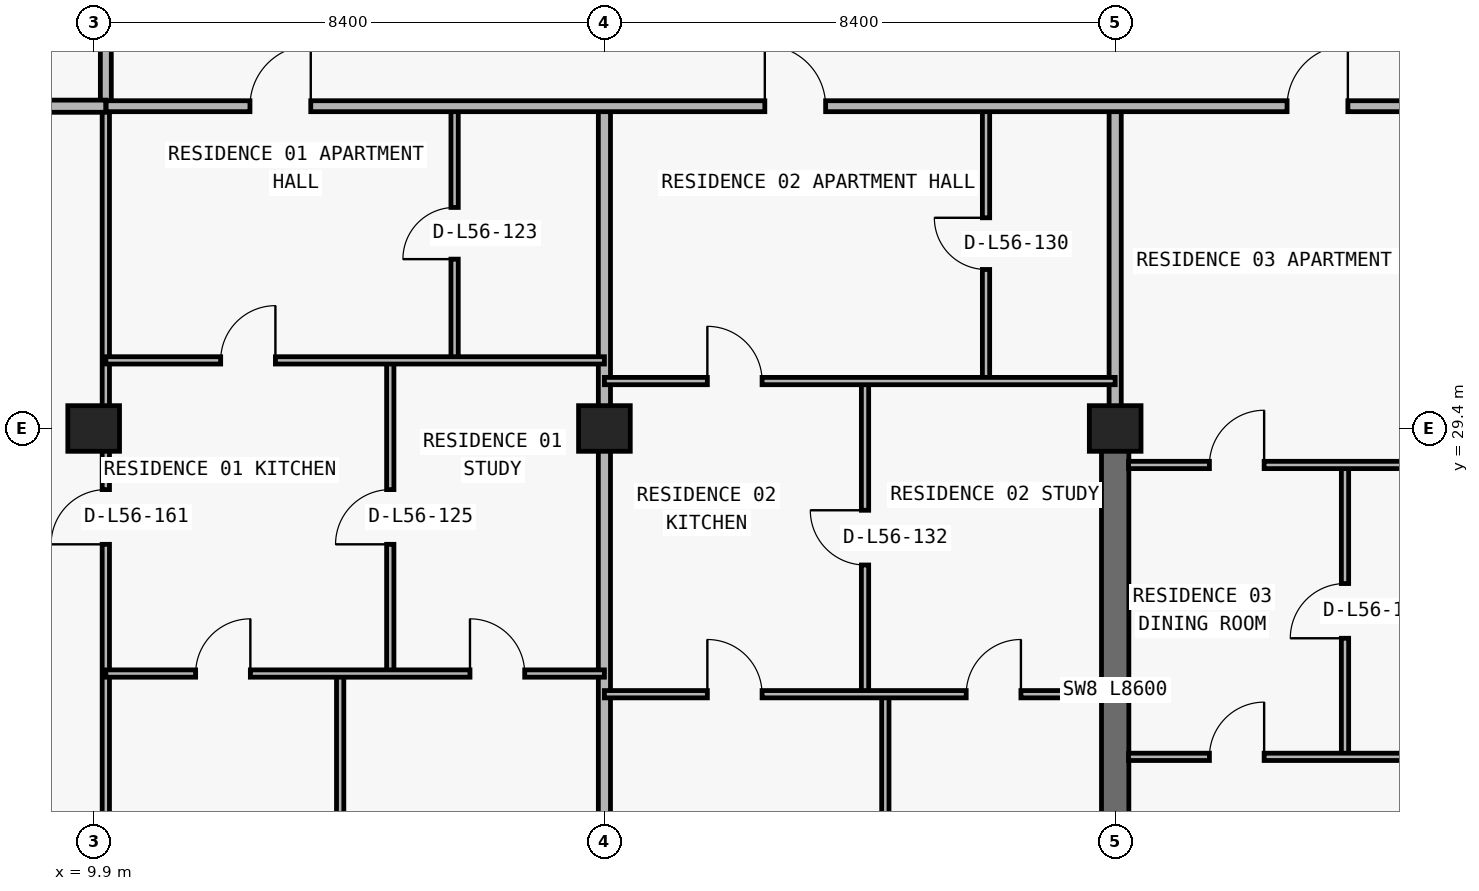
"""IFC4 building model, lengths in metres.
Left out: names, types, materials, properties, quantities, classifications, styles, units other than length and angle.
Written with IfcOpenShell. Run it as: python <this file> out.ifc"""

import sys

from ifc_helpers import new_model, si_unit, direction, frame, frame_2d, origin, origin_2d, place, context, subcontext, project, spatial, rectangle, extrude, element, fill, save


model = new_model("IFC4")
c1 = context("Model", 3, precision=1e-05, world=origin(), true_north=direction((0.0, 1.0)))
c2 = subcontext(c1, "Body", "Model", "MODEL_VIEW")
j1 = project(units=[si_unit("LENGTHUNIT", "METRE"), si_unit("PLANEANGLEUNIT", "RADIAN")], contexts=[c1])
p1 = place(None, origin())
s1 = spatial("IfcSite", under=j1, at=p1, CompositionType="ELEMENT")
p2 = place(p1, origin())
s2 = spatial("IfcBuilding", under=s1, at=p2, CompositionType="ELEMENT")
p3 = place(p2, frame((0.0, 0.0, 201.6)))
s3 = spatial("IfcBuildingStorey", under=s2, at=p3, CompositionType="ELEMENT", Elevation=201.6)
for number, where, z_axis, x_axis in (
    (1, (9.9, 29.4, 0.0), (0.0, 0.0, 1.0), (1.0, 0.0, 0.0)),
    (2, (18.3, 29.4, 0.0), (0.0, 0.0, 1.0), (1.0, 0.0, 0.0)),
    (3, (26.7, 29.4, 0.0), (0.0, 0.0, 1.0), (1.0, 0.0, 0.0)),
):
    element("IfcColumn", number, at=place(p3, frame(where, z_axis=z_axis, x_axis=x_axis)), inside=s3, PredefinedType="COLUMN", context=c2, shape_type="SweptSolid", body=[
        extrude(rectangle(XDim=0.85, YDim=0.75, at=origin_2d()), origin(), (0.0, 0.0, 1.0), 3.05),
    ])
p4 = place(p3, frame((26.7, 20.8, 0.0), z_axis=(0.0, 0.0, 1.0), x_axis=(0.0, 1.0, 0.0)))
e4 = element("IfcWall", 4, at=p4, inside=s3, PredefinedType="SHEAR", context=c2, shape_type="SweptSolid", body=[
    extrude(rectangle(XDim=8.6, YDim=0.45, at=frame_2d((4.3, 0.0))), origin(), (0.0, 0.0, 1.0), 3.05),
])
p5 = place(p3, frame((10.1, 11.285, 0.0), z_axis=(0.0, 0.0, 1.0), x_axis=(0.0, 1.0, 0.0)))
e5 = element("IfcWall", 5, at=p5, inside=s3, PredefinedType="PARTITIONING", context=c2, shape_type="SweptSolid", body=[
    extrude(rectangle(XDim=23.415, YDim=0.12, at=frame_2d((11.708, 0.0))), origin(), (0.0, 0.0, 1.0), 2.263),
])
p6 = place(p5, frame((16.21, 0.0, 0.0)))
e6 = element("IfcOpeningElement", 6, at=p6, cuts=e5, PredefinedType="OPENING", context=c2, shape_type="SweptSolid", body=[
    extrude(rectangle(XDim=0.9, YDim=2.15, at=frame_2d((0.45, 1.075))), frame((0.0, 0.07, 0.0), z_axis=(0.0, -1.0, 0.0), x_axis=(1.0, 0.0, 0.0)), (0.0, 0.0, 1.0), 0.14),
])
p7 = place(p3, frame((10.1, 34.705, 0.0), z_axis=(0.0, 0.0, 1.0), x_axis=(0.0, 1.0, 0.0)))
e7 = element("IfcWall", 7, at=p7, inside=s3, PredefinedType="PARTITIONING", context=c2, shape_type="SweptSolid", body=[
    extrude(rectangle(XDim=2.295, YDim=0.18, at=frame_2d((1.147, 0.0))), origin(), (0.0, 0.0, 1.0), 2.263),
])
p8 = place(p3, frame((13.954, 11.24, 0.0), z_axis=(0.0, 0.0, 1.0), x_axis=(0.0, 1.0, 0.0)))
e8 = element("IfcWall", 8, at=p8, inside=s3, PredefinedType="PARTITIONING", context=c2, shape_type="SweptSolid", body=[
    extrude(rectangle(XDim=14.13, YDim=0.12, at=frame_2d((7.065, 0.0))), origin(), (0.0, 0.0, 1.0), 3.05),
])
p9 = place(p3, frame((14.778, 25.37, 0.0), z_axis=(0.0, 0.0, 1.0), x_axis=(0.0, 1.0, 0.0)))
e9 = element("IfcWall", 9, at=p9, inside=s3, PredefinedType="PARTITIONING", context=c2, shape_type="SweptSolid", body=[
    extrude(rectangle(XDim=5.15, YDim=0.12, at=frame_2d((2.575, 0.0))), origin(), (0.0, 0.0, 1.0), 3.05),
])
p10 = place(p9, frame((2.125, 0.0, 0.0)))
e10 = element("IfcOpeningElement", 10, at=p10, cuts=e9, PredefinedType="OPENING", context=c2, shape_type="SweptSolid", body=[
    extrude(rectangle(XDim=0.9, YDim=2.15, at=frame_2d((0.45, 1.075))), frame((0.0, 0.07, 0.0), z_axis=(0.0, -1.0, 0.0), x_axis=(1.0, 0.0, 0.0)), (0.0, 0.0, 1.0), 0.14),
])
p11 = place(p3, frame((15.836, 30.52, 0.0), z_axis=(0.0, 0.0, 1.0), x_axis=(0.0, 1.0, 0.0)))
e11 = element("IfcWall", 11, at=p11, inside=s3, PredefinedType="PARTITIONING", context=c2, shape_type="SweptSolid", body=[
    extrude(rectangle(XDim=4.18, YDim=0.12, at=frame_2d((2.09, 0.0))), origin(), (0.0, 0.0, 1.0), 3.05),
])
p12 = place(p11, frame((1.665, 0.0, 0.0)))
e12 = element("IfcOpeningElement", 12, at=p12, cuts=e11, PredefinedType="OPENING", context=c2, shape_type="SweptSolid", body=[
    extrude(rectangle(XDim=0.85, YDim=2.1, at=frame_2d((0.425, 1.05))), frame((0.0, 0.07, 0.0), z_axis=(0.0, -1.0, 0.0), x_axis=(1.0, 0.0, 0.0)), (0.0, 0.0, 1.0), 0.14),
])
p13 = place(p3, frame((18.3, 11.24, 0.0), z_axis=(0.0, 0.0, 1.0), x_axis=(0.0, 1.0, 0.0)))
e13 = element("IfcWall", 13, at=p13, inside=s3, PredefinedType="PARTITIONING", context=c2, shape_type="SweptSolid", body=[
    extrude(rectangle(XDim=23.46, YDim=0.2, at=frame_2d((11.73, 0.0))), origin(), (0.0, 0.0, 1.0), 2.263),
])
p14 = place(p3, frame((22.586, 25.03, 0.0), z_axis=(0.0, 0.0, 1.0), x_axis=(0.0, 1.0, 0.0)))
e14 = element("IfcWall", 14, at=p14, inside=s3, PredefinedType="PARTITIONING", context=c2, shape_type="SweptSolid", body=[
    extrude(rectangle(XDim=5.15, YDim=0.12, at=frame_2d((2.575, 0.0))), origin(), (0.0, 0.0, 1.0), 2.725),
])
p15 = place(p14, frame((2.125, 0.0, 0.0)))
e15 = element("IfcOpeningElement", 15, at=p15, cuts=e14, PredefinedType="OPENING", context=c2, shape_type="SweptSolid", body=[
    extrude(rectangle(XDim=0.9, YDim=2.15, at=frame_2d((0.45, 1.075))), frame((0.0, 0.07, 0.0), z_axis=(0.0, -1.0, 0.0), x_axis=(1.0, 0.0, 0.0)), (0.0, 0.0, 1.0), 0.14),
])
p16 = place(p3, frame((22.92, 11.24, 0.0), z_axis=(0.0, 0.0, 1.0), x_axis=(0.0, 1.0, 0.0)))
e16 = element("IfcWall", 16, at=p16, inside=s3, PredefinedType="PARTITIONING", context=c2, shape_type="SweptSolid", body=[
    extrude(rectangle(XDim=13.79, YDim=0.12, at=frame_2d((6.895, 0.0))), origin(), (0.0, 0.0, 1.0), 3.05),
])
p17 = place(p3, frame((24.576, 30.18, 0.0), z_axis=(0.0, 0.0, 1.0), x_axis=(0.0, 1.0, 0.0)))
e17 = element("IfcWall", 17, at=p17, inside=s3, PredefinedType="PARTITIONING", context=c2, shape_type="SweptSolid", body=[
    extrude(rectangle(XDim=4.52, YDim=0.12, at=frame_2d((2.26, 0.0))), origin(), (0.0, 0.0, 1.0), 3.05),
])
p18 = place(p17, frame((1.835, 0.0, 0.0)))
e18 = element("IfcOpeningElement", 18, at=p18, cuts=e17, PredefinedType="OPENING", context=c2, shape_type="SweptSolid", body=[
    extrude(rectangle(XDim=0.85, YDim=2.1, at=frame_2d((0.425, 1.05))), frame((0.0, 0.07, 0.0), z_axis=(0.0, -1.0, 0.0), x_axis=(1.0, 0.0, 0.0)), (0.0, 0.0, 1.0), 0.14),
])
p19 = place(p3, frame((26.7, 29.405, 0.0), z_axis=(0.0, 0.0, 1.0), x_axis=(0.0, 1.0, 0.0)))
e19 = element("IfcWall", 19, at=p19, inside=s3, PredefinedType="PARTITIONING", context=c2, shape_type="SweptSolid", body=[
    extrude(rectangle(XDim=5.295, YDim=0.2, at=frame_2d((2.647, 0.0))), origin(), (0.0, 0.0, 1.0), 2.335),
])
p20 = place(p3, frame((30.48, 24.0, 0.0), z_axis=(0.0, 0.0, 1.0), x_axis=(0.0, 1.0, 0.0)))
e20 = element("IfcWall", 20, at=p20, inside=s3, PredefinedType="PARTITIONING", context=c2, shape_type="SweptSolid", body=[
    extrude(rectangle(XDim=4.8, YDim=0.12, at=frame_2d((2.4, 0.0))), origin(), (0.0, 0.0, 1.0), 3.05),
])
p21 = place(p20, frame((1.95, 0.0, 0.0)))
e21 = element("IfcOpeningElement", 21, at=p21, cuts=e20, PredefinedType="OPENING", context=c2, shape_type="SweptSolid", body=[
    extrude(rectangle(XDim=0.9, YDim=2.15, at=frame_2d((0.45, 1.075))), frame((0.0, 0.07, 0.0), z_axis=(0.0, -1.0, 0.0), x_axis=(1.0, 0.0, 0.0)), (0.0, 0.0, 1.0), 0.14),
])
p22 = place(p3, frame((26.92, 24.0, 0.0), z_axis=(0.0, 0.0, 1.0), x_axis=(1.0, 0.0, 0.0)))
e22 = element("IfcWall", 22, at=p22, inside=s3, PredefinedType="PARTITIONING", context=c2, shape_type="SweptSolid", body=[
    extrude(rectangle(XDim=8.18, YDim=0.12, at=frame_2d((4.09, 0.0))), origin(), (0.0, 0.0, 1.0), 3.05),
])
p23 = place(p22, frame((1.33, 0.0, 0.0)))
e23 = element("IfcOpeningElement", 23, at=p23, cuts=e22, PredefinedType="OPENING", context=c2, shape_type="SweptSolid", body=[
    extrude(rectangle(XDim=0.9, YDim=2.15, at=frame_2d((0.45, 1.075))), frame((0.0, 0.07, 0.0), z_axis=(0.0, -1.0, 0.0), x_axis=(1.0, 0.0, 0.0)), (0.0, 0.0, 1.0), 0.14),
])
p24 = place(p3, frame((18.3, 25.03, 0.0), z_axis=(0.0, 0.0, 1.0), x_axis=(1.0, 0.0, 0.0)))
e24 = element("IfcWall", 24, at=p24, inside=s3, PredefinedType="PARTITIONING", context=c2, shape_type="SweptSolid", body=[
    extrude(rectangle(XDim=8.18, YDim=0.12, at=frame_2d((4.09, 0.0))), origin(), (0.0, 0.0, 1.0), 3.05),
])
p25 = place(p24, frame((1.693, 0.0, 0.0)))
e25 = element("IfcOpeningElement", 25, at=p25, cuts=e24, PredefinedType="OPENING", context=c2, shape_type="SweptSolid", body=[
    extrude(rectangle(XDim=0.9, YDim=2.15, at=frame_2d((0.45, 1.075))), frame((0.0, 0.07, 0.0), z_axis=(0.0, -1.0, 0.0), x_axis=(1.0, 0.0, 0.0)), (0.0, 0.0, 1.0), 0.14),
])
p26 = place(p24, frame((5.95, 0.0, 0.0)))
e26 = element("IfcOpeningElement", 26, at=p26, cuts=e24, PredefinedType="OPENING", context=c2, shape_type="SweptSolid", body=[
    extrude(rectangle(XDim=0.9, YDim=2.15, at=frame_2d((0.45, 1.075))), frame((0.0, 0.07, 0.0), z_axis=(0.0, -1.0, 0.0), x_axis=(1.0, 0.0, 0.0)), (0.0, 0.0, 1.0), 0.14),
])
p27 = place(p3, frame((10.1, 25.37, 0.0), z_axis=(0.0, 0.0, 1.0), x_axis=(1.0, 0.0, 0.0)))
e27 = element("IfcWall", 27, at=p27, inside=s3, PredefinedType="PARTITIONING", context=c2, shape_type="SweptSolid", body=[
    extrude(rectangle(XDim=8.2, YDim=0.12, at=frame_2d((4.1, 0.0))), origin(), (0.0, 0.0, 1.0), 3.05),
])
p28 = place(p27, frame((1.477, 0.0, 0.0)))
e28 = element("IfcOpeningElement", 28, at=p28, cuts=e27, PredefinedType="OPENING", context=c2, shape_type="SweptSolid", body=[
    extrude(rectangle(XDim=0.9, YDim=2.15, at=frame_2d((0.45, 1.075))), frame((0.0, 0.07, 0.0), z_axis=(0.0, -1.0, 0.0), x_axis=(1.0, 0.0, 0.0)), (0.0, 0.0, 1.0), 0.14),
])
p29 = place(p27, frame((5.989, 0.0, 0.0)))
e29 = element("IfcOpeningElement", 29, at=p29, cuts=e27, PredefinedType="OPENING", context=c2, shape_type="SweptSolid", body=[
    extrude(rectangle(XDim=0.9, YDim=2.15, at=frame_2d((0.45, 1.075))), frame((0.0, 0.07, 0.0), z_axis=(0.0, -1.0, 0.0), x_axis=(1.0, 0.0, 0.0)), (0.0, 0.0, 1.0), 0.14),
])
p30 = place(p3, frame((26.92, 28.8, 0.0), z_axis=(0.0, 0.0, 1.0), x_axis=(1.0, 0.0, 0.0)))
e30 = element("IfcWall", 30, at=p30, inside=s3, PredefinedType="PARTITIONING", context=c2, shape_type="SweptSolid", body=[
    extrude(rectangle(XDim=8.175, YDim=0.12, at=frame_2d((4.087, 0.0))), origin(), (0.0, 0.0, 1.0), 3.05),
])
p31 = place(p30, frame((1.33, 0.0, 0.0)))
e31 = element("IfcOpeningElement", 31, at=p31, cuts=e30, PredefinedType="OPENING", context=c2, shape_type="SweptSolid", body=[
    extrude(rectangle(XDim=0.9, YDim=2.15, at=frame_2d((0.45, 1.075))), frame((0.0, 0.07, 0.0), z_axis=(0.0, -1.0, 0.0), x_axis=(1.0, 0.0, 0.0)), (0.0, 0.0, 1.0), 0.14),
])
p32 = place(p3, frame((18.3, 30.18, 0.0), z_axis=(0.0, 0.0, 1.0), x_axis=(1.0, 0.0, 0.0)))
e32 = element("IfcWall", 32, at=p32, inside=s3, PredefinedType="PARTITIONING", context=c2, shape_type="SweptSolid", body=[
    extrude(rectangle(XDim=8.4, YDim=0.12, at=frame_2d((4.2, 0.0))), origin(), (0.0, 0.0, 1.0), 3.05),
])
p33 = place(p32, frame((1.693, 0.0, 0.0)))
e33 = element("IfcOpeningElement", 33, at=p33, cuts=e32, PredefinedType="OPENING", context=c2, shape_type="SweptSolid", body=[
    extrude(rectangle(XDim=0.9, YDim=2.15, at=frame_2d((0.45, 1.075))), frame((0.0, 0.07, 0.0), z_axis=(0.0, -1.0, 0.0), x_axis=(1.0, 0.0, 0.0)), (0.0, 0.0, 1.0), 0.14),
])
p34 = place(p3, frame((10.1, 30.52, 0.0), z_axis=(0.0, 0.0, 1.0), x_axis=(1.0, 0.0, 0.0)))
e34 = element("IfcWall", 34, at=p34, inside=s3, PredefinedType="PARTITIONING", context=c2, shape_type="SweptSolid", body=[
    extrude(rectangle(XDim=8.2, YDim=0.12, at=frame_2d((4.1, 0.0))), origin(), (0.0, 0.0, 1.0), 3.05),
])
p35 = place(p34, frame((1.889, 0.0, 0.0)))
e35 = element("IfcOpeningElement", 35, at=p35, cuts=e34, PredefinedType="OPENING", context=c2, shape_type="SweptSolid", body=[
    extrude(rectangle(XDim=0.9, YDim=2.15, at=frame_2d((0.45, 1.075))), frame((0.0, 0.07, 0.0), z_axis=(0.0, -1.0, 0.0), x_axis=(1.0, 0.0, 0.0)), (0.0, 0.0, 1.0), 0.14),
])
p36 = place(p3, frame((6.395, 34.7, 0.0), z_axis=(0.0, 0.0, 1.0), x_axis=(1.0, 0.0, 0.0)))
e36 = element("IfcWall", 36, at=p36, inside=s3, PredefinedType="PARTITIONING", context=c2, shape_type="SweptSolid", body=[
    extrude(rectangle(XDim=3.705, YDim=0.2, at=frame_2d((1.853, 0.0))), origin(), (0.0, 0.0, 1.0), 3.05),
])
p37 = place(p3, frame((10.105, 34.7, 0.0), z_axis=(0.0, 0.0, 1.0), x_axis=(1.0, 0.0, 0.0)))
e37 = element("IfcWall", 37, at=p37, inside=s3, PredefinedType="PARTITIONING", context=c2, shape_type="SweptSolid", body=[
    extrude(rectangle(XDim=31.021, YDim=0.18, at=frame_2d((15.51, 0.0))), origin(), (0.0, 0.0, 1.0), 3.05),
])
p38 = place(p37, frame((2.365, 0.0, 0.0)))
e38 = element("IfcOpeningElement", 38, at=p38, cuts=e37, PredefinedType="OPENING", context=c2, shape_type="SweptSolid", body=[
    extrude(rectangle(XDim=1.0, YDim=2.2, at=frame_2d((0.5, 1.1))), frame((0.0, 0.1, 0.0), z_axis=(0.0, -1.0, 0.0), x_axis=(1.0, 0.0, 0.0)), (0.0, 0.0, 1.0), 0.2),
])
p39 = place(p37, frame((10.833, 0.0, 0.0)))
e39 = element("IfcOpeningElement", 39, at=p39, cuts=e37, PredefinedType="OPENING", context=c2, shape_type="SweptSolid", body=[
    extrude(rectangle(XDim=1.0, YDim=2.2, at=frame_2d((0.5, 1.1))), frame((0.0, 0.1, 0.0), z_axis=(0.0, -1.0, 0.0), x_axis=(1.0, 0.0, 0.0)), (0.0, 0.0, 1.0), 0.2),
])
p40 = place(p37, frame((19.422, 0.0, 0.0)))
e40 = element("IfcOpeningElement", 40, at=p40, cuts=e37, PredefinedType="OPENING", context=c2, shape_type="SweptSolid", body=[
    extrude(rectangle(XDim=1.0, YDim=2.2, at=frame_2d((0.5, 1.1))), frame((0.0, 0.1, 0.0), z_axis=(0.0, -1.0, 0.0), x_axis=(1.0, 0.0, 0.0)), (0.0, 0.0, 1.0), 0.2),
])
p41 = place(p38, origin())
e41 = element("IfcDoor", 41, at=p41, inside=s3, OperationType="SINGLE_SWING_RIGHT", PredefinedType="DOOR", context=c2, shape_type="SweptSolid", body=[
    extrude(rectangle(XDim=1.0, YDim=2.2, at=frame_2d((0.5, 1.1))), frame((0.0, 0.025, 0.0), z_axis=(0.0, -1.0, 0.0), x_axis=(1.0, 0.0, 0.0)), (0.0, 0.0, 1.0), 0.05),
])
fill(e38, e41)
p42 = place(p12, origin())
e42 = element("IfcDoor", 42, at=p42, inside=s3, OperationType="SINGLE_SWING_LEFT", PredefinedType="DOOR", context=c2, shape_type="SweptSolid", body=[
    extrude(rectangle(XDim=0.85, YDim=2.1, at=frame_2d((0.425, 1.05))), frame((0.0, 0.025, 0.0), z_axis=(0.0, -1.0, 0.0), x_axis=(1.0, 0.0, 0.0)), (0.0, 0.0, 1.0), 0.05),
])
fill(e12, e42)
p43 = place(p35, origin())
e43 = element("IfcDoor", 43, at=p43, inside=s3, OperationType="SINGLE_SWING_RIGHT", PredefinedType="DOOR", context=c2, shape_type="SweptSolid", body=[
    extrude(rectangle(XDim=0.9, YDim=2.15, at=frame_2d((0.45, 1.075))), frame((0.0, 0.025, 0.0), z_axis=(0.0, -1.0, 0.0), x_axis=(1.0, 0.0, 0.0)), (0.0, 0.0, 1.0), 0.05),
])
fill(e35, e43)
p44 = place(p10, origin())
e44 = element("IfcDoor", 44, at=p44, inside=s3, OperationType="SINGLE_SWING_LEFT", PredefinedType="DOOR", context=c2, shape_type="SweptSolid", body=[
    extrude(rectangle(XDim=0.9, YDim=2.15, at=frame_2d((0.45, 1.075))), frame((0.0, 0.025, 0.0), z_axis=(0.0, -1.0, 0.0), x_axis=(1.0, 0.0, 0.0)), (0.0, 0.0, 1.0), 0.05),
])
fill(e10, e44)
p45 = place(p28, origin())
e45 = element("IfcDoor", 45, at=p45, inside=s3, OperationType="SINGLE_SWING_RIGHT", PredefinedType="DOOR", context=c2, shape_type="SweptSolid", body=[
    extrude(rectangle(XDim=0.9, YDim=2.15, at=frame_2d((0.45, 1.075))), frame((0.0, 0.025, 0.0), z_axis=(0.0, -1.0, 0.0), x_axis=(1.0, 0.0, 0.0)), (0.0, 0.0, 1.0), 0.05),
])
fill(e28, e45)
p46 = place(p29, origin())
e46 = element("IfcDoor", 46, at=p46, inside=s3, OperationType="SINGLE_SWING_LEFT", PredefinedType="DOOR", context=c2, shape_type="SweptSolid", body=[
    extrude(rectangle(XDim=0.9, YDim=2.15, at=frame_2d((0.45, 1.075))), frame((0.0, 0.025, 0.0), z_axis=(0.0, -1.0, 0.0), x_axis=(1.0, 0.0, 0.0)), (0.0, 0.0, 1.0), 0.05),
])
fill(e29, e46)
p47 = place(p39, origin())
e47 = element("IfcDoor", 47, at=p47, inside=s3, OperationType="SINGLE_SWING_LEFT", PredefinedType="DOOR", context=c2, shape_type="SweptSolid", body=[
    extrude(rectangle(XDim=1.0, YDim=2.2, at=frame_2d((0.5, 1.1))), frame((0.0, 0.025, 0.0), z_axis=(0.0, -1.0, 0.0), x_axis=(1.0, 0.0, 0.0)), (0.0, 0.0, 1.0), 0.05),
])
fill(e39, e47)
p48 = place(p18, origin())
e48 = element("IfcDoor", 48, at=p48, inside=s3, OperationType="SINGLE_SWING_RIGHT", PredefinedType="DOOR", context=c2, shape_type="SweptSolid", body=[
    extrude(rectangle(XDim=0.85, YDim=2.1, at=frame_2d((0.425, 1.05))), frame((0.0, 0.025, 0.0), z_axis=(0.0, -1.0, 0.0), x_axis=(1.0, 0.0, 0.0)), (0.0, 0.0, 1.0), 0.05),
])
fill(e18, e48)
p49 = place(p33, origin())
e49 = element("IfcDoor", 49, at=p49, inside=s3, OperationType="SINGLE_SWING_LEFT", PredefinedType="DOOR", context=c2, shape_type="SweptSolid", body=[
    extrude(rectangle(XDim=0.9, YDim=2.15, at=frame_2d((0.45, 1.075))), frame((0.0, 0.025, 0.0), z_axis=(0.0, -1.0, 0.0), x_axis=(1.0, 0.0, 0.0)), (0.0, 0.0, 1.0), 0.05),
])
fill(e33, e49)
p50 = place(p15, origin())
e50 = element("IfcDoor", 50, at=p50, inside=s3, OperationType="SINGLE_SWING_RIGHT", PredefinedType="DOOR", context=c2, shape_type="SweptSolid", body=[
    extrude(rectangle(XDim=0.9, YDim=2.15, at=frame_2d((0.45, 1.075))), frame((0.0, 0.025, 0.0), z_axis=(0.0, -1.0, 0.0), x_axis=(1.0, 0.0, 0.0)), (0.0, 0.0, 1.0), 0.05),
])
fill(e15, e50)
p51 = place(p25, origin())
e51 = element("IfcDoor", 51, at=p51, inside=s3, OperationType="SINGLE_SWING_LEFT", PredefinedType="DOOR", context=c2, shape_type="SweptSolid", body=[
    extrude(rectangle(XDim=0.9, YDim=2.15, at=frame_2d((0.45, 1.075))), frame((0.0, 0.025, 0.0), z_axis=(0.0, -1.0, 0.0), x_axis=(1.0, 0.0, 0.0)), (0.0, 0.0, 1.0), 0.05),
])
fill(e25, e51)
p52 = place(p26, origin())
e52 = element("IfcDoor", 52, at=p52, inside=s3, OperationType="SINGLE_SWING_RIGHT", PredefinedType="DOOR", context=c2, shape_type="SweptSolid", body=[
    extrude(rectangle(XDim=0.9, YDim=2.15, at=frame_2d((0.45, 1.075))), frame((0.0, 0.025, 0.0), z_axis=(0.0, -1.0, 0.0), x_axis=(1.0, 0.0, 0.0)), (0.0, 0.0, 1.0), 0.05),
])
fill(e26, e52)
p53 = place(p40, origin())
e53 = element("IfcDoor", 53, at=p53, inside=s3, OperationType="SINGLE_SWING_RIGHT", PredefinedType="DOOR", context=c2, shape_type="SweptSolid", body=[
    extrude(rectangle(XDim=1.0, YDim=2.2, at=frame_2d((0.5, 1.1))), frame((0.0, 0.025, 0.0), z_axis=(0.0, -1.0, 0.0), x_axis=(1.0, 0.0, 0.0)), (0.0, 0.0, 1.0), 0.05),
])
fill(e40, e53)
p54 = place(p31, origin())
e54 = element("IfcDoor", 54, at=p54, inside=s3, OperationType="SINGLE_SWING_RIGHT", PredefinedType="DOOR", context=c2, shape_type="SweptSolid", body=[
    extrude(rectangle(XDim=0.9, YDim=2.15, at=frame_2d((0.45, 1.075))), frame((0.0, 0.025, 0.0), z_axis=(0.0, -1.0, 0.0), x_axis=(1.0, 0.0, 0.0)), (0.0, 0.0, 1.0), 0.05),
])
fill(e31, e54)
p55 = place(p21, origin())
e55 = element("IfcDoor", 55, at=p55, inside=s3, OperationType="SINGLE_SWING_LEFT", PredefinedType="DOOR", context=c2, shape_type="SweptSolid", body=[
    extrude(rectangle(XDim=0.9, YDim=2.15, at=frame_2d((0.45, 1.075))), frame((0.0, 0.025, 0.0), z_axis=(0.0, -1.0, 0.0), x_axis=(1.0, 0.0, 0.0)), (0.0, 0.0, 1.0), 0.05),
])
fill(e21, e55)
p56 = place(p23, origin())
e56 = element("IfcDoor", 56, at=p56, inside=s3, OperationType="SINGLE_SWING_RIGHT", PredefinedType="DOOR", context=c2, shape_type="SweptSolid", body=[
    extrude(rectangle(XDim=0.9, YDim=2.15, at=frame_2d((0.45, 1.075))), frame((0.0, 0.025, 0.0), z_axis=(0.0, -1.0, 0.0), x_axis=(1.0, 0.0, 0.0)), (0.0, 0.0, 1.0), 0.05),
])
fill(e23, e56)
p57 = place(p6, origin())
e57 = element("IfcDoor", 57, at=p57, inside=s3, OperationType="SINGLE_SWING_LEFT", PredefinedType="DOOR", context=c2, shape_type="SweptSolid", body=[
    extrude(rectangle(XDim=0.9, YDim=2.15, at=frame_2d((0.45, 1.075))), frame((0.0, 0.025, 0.0), z_axis=(0.0, -1.0, 0.0), x_axis=(1.0, 0.0, 0.0)), (0.0, 0.0, 1.0), 0.05),
])
fill(e6, e57)
save(model, sys.argv[1])
